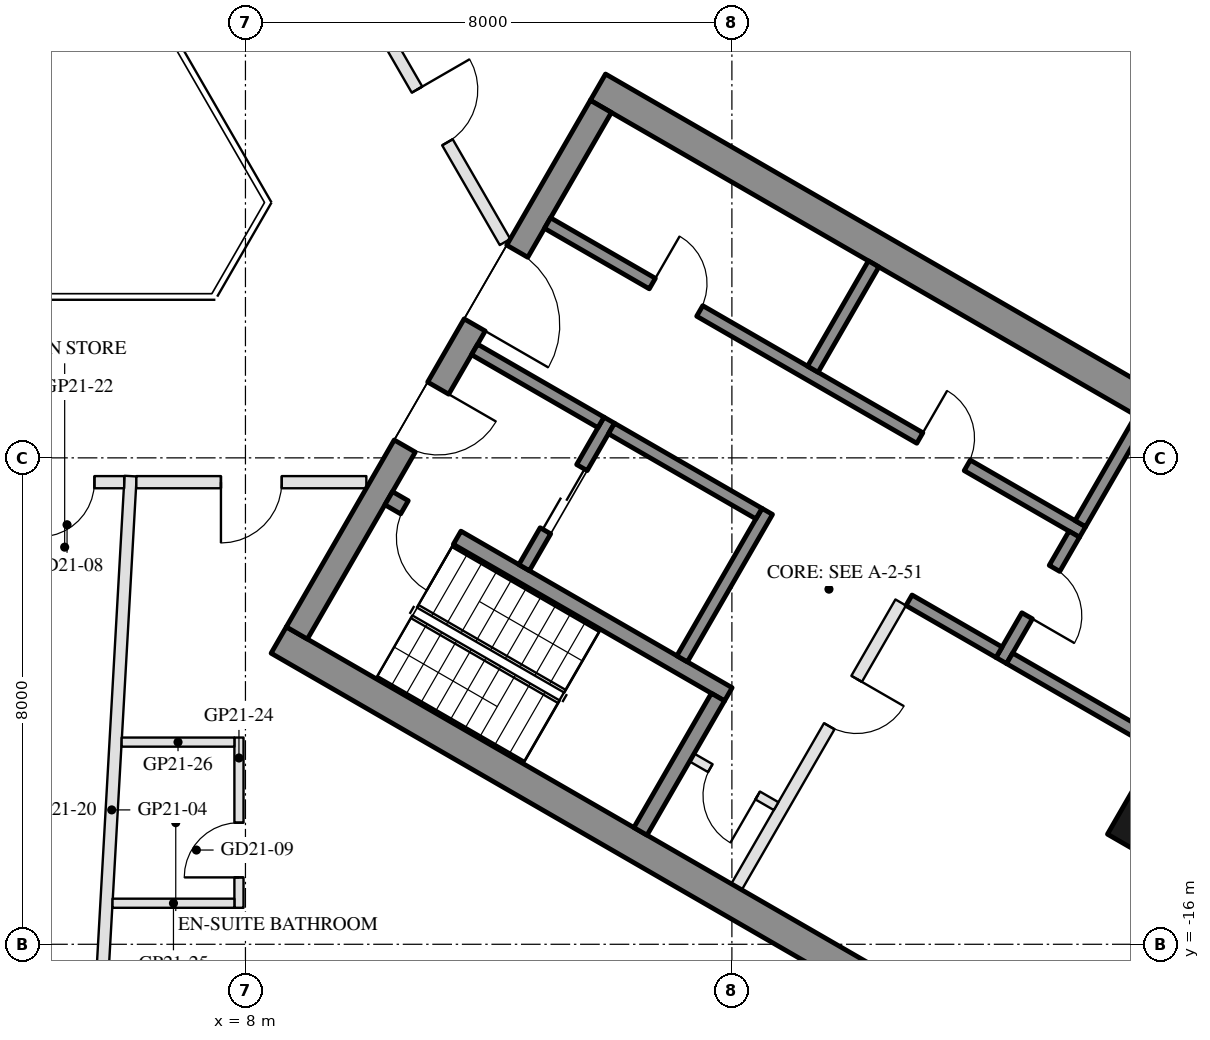
"""IFC4 building model, lengths in metres.
Left out: names, types, materials, properties, quantities, classifications, styles, units other than length and angle.
Written with IfcOpenShell. Run it as: python <this file> out.ifc"""

import sys

from ifc_helpers import new_model, si_unit, direction, frame, frame_2d, origin, origin_2d, place, context, subcontext, project, spatial, rectangle, hollow_rectangle, extrude, element, fill, save


model = new_model("IFC4")
c1 = context("Model", 3, precision=1e-05, world=origin(), true_north=direction((0.0, 1.0)))
c2 = subcontext(c1, "Body", "Model", "MODEL_VIEW")
j1 = project(units=[si_unit("LENGTHUNIT", "METRE"), si_unit("PLANEANGLEUNIT", "RADIAN")], contexts=[c1])
p1 = place(None, origin())
s1 = spatial("IfcSite", under=j1, at=p1, CompositionType="ELEMENT")
p2 = place(p1, origin())
s2 = spatial("IfcBuilding", under=s1, at=p2, CompositionType="ELEMENT")
p3 = place(p2, frame((0.0, 0.0, 220.6)))
s3 = spatial("IfcBuildingStorey", under=s2, at=p3, CompositionType="ELEMENT", Elevation=220.6)
p4 = place(p3, frame((23.729, -13.7, 0.0), z_axis=(0.0, 0.0, 1.0), x_axis=(0.5, 0.866025403784, 0.0)))
e1 = element("IfcColumn", 1, at=p4, inside=s3, PredefinedType="COLUMN", context=c2, shape_type="SweptSolid", body=[
    extrude(hollow_rectangle(XDim=2.4, YDim=2.2, WallThickness=0.06, at=origin_2d()), origin(), (0.0, 0.0, 1.0), 3.7),
])
p5 = place(p3, frame((26.257, -6.567, 0.0), z_axis=(0.0, 0.0, 1.0), x_axis=(-0.500023526245, 0.866011820475, 0.0)))
e2 = element("IfcWall", 2, at=p5, inside=s3, PredefinedType="SOLIDWALL", context=c2, shape_type="SweptSolid", body=[
    extrude(rectangle(XDim=11.816, YDim=0.35, at=frame_2d((5.908, 0.0))), origin(), (0.0, 0.0, 1.0), 3.55),
])
p6 = place(p5, frame((0.38, 0.0, 0.3)))
e3 = element("IfcOpeningElement", 3, at=p6, cuts=e2, PredefinedType="OPENING", context=c2, shape_type="SweptSolid", body=[
    extrude(rectangle(XDim=1.9, YDim=2.65, at=frame_2d((0.95, 1.325))), frame((0.0, 0.185, 0.0), z_axis=(0.0, -1.0, 0.0), x_axis=(1.0, 0.0, 0.0)), (0.0, 0.0, 1.0), 0.37),
])
p7 = place(p5, frame((7.791, 0.0, 0.0)))
e4 = element("IfcOpeningElement", 4, at=p7, cuts=e2, PredefinedType="OPENING", context=c2, shape_type="SweptSolid", body=[
    extrude(rectangle(XDim=2.4, YDim=2.4, at=frame_2d((1.2, 1.2))), frame((0.0, 0.185, 0.0), z_axis=(0.0, -1.0, 0.0), x_axis=(1.0, 0.0, 0.0)), (0.0, 0.0, 1.0), 0.37),
])
p8 = place(p5, frame((3.741, 0.0, 0.3)))
e5 = element("IfcOpeningElement", 5, at=p8, cuts=e2, PredefinedType="OPENING", context=c2, shape_type="SweptSolid", body=[
    extrude(rectangle(XDim=1.7, YDim=2.65, at=frame_2d((0.85, 1.325))), frame((0.0, 0.185, 0.0), z_axis=(0.0, -1.0, 0.0), x_axis=(1.0, 0.0, 0.0)), (0.0, 0.0, 1.0), 0.37),
])
p9 = place(p5, frame((5.741, 0.0, 0.3)))
e6 = element("IfcOpeningElement", 6, at=p9, cuts=e2, PredefinedType="OPENING", context=c2, shape_type="SweptSolid", body=[
    extrude(rectangle(XDim=1.7, YDim=2.65, at=frame_2d((0.85, 1.325))), frame((0.0, 0.185, 0.0), z_axis=(0.0, -1.0, 0.0), x_axis=(1.0, 0.0, 0.0)), (0.0, 0.0, 1.0), 0.37),
])
for number, where, z_axis, x_axis in (
    (7, (8.547, -10.997, 0.0), (0.0, 0.0, 1.0), (0.866, -0.5, 0.0)),
    (8, (13.797, -1.903, 0.0), (0.0, 0.0, 1.0), (0.866, -0.5, 0.0)),
):
    element("IfcWall", number, at=place(p3, frame(where, z_axis=z_axis, x_axis=x_axis)), inside=s3, PredefinedType="SHEAR", context=c2, shape_type="SweptSolid", body=[
        extrude(rectangle(XDim=14.837, YDim=0.5, at=frame_2d((7.418, 0.0))), origin(), (0.0, 0.0, 1.0), 3.5),
    ])
p10 = place(p3, frame((8.845, -10.88, 0.0), z_axis=(0.0, 0.0, 1.0), x_axis=(0.500004234368, 0.866022959057, 0.0)))
e9 = element("IfcWall", 9, at=p10, inside=s3, PredefinedType="SHEAR", context=c2, shape_type="SweptSolid", body=[
    extrude(rectangle(XDim=10.0, YDim=0.4, at=frame_2d((5.0, 0.0))), origin(), (0.0, 0.0, 1.0), 3.5),
])
p11 = place(p10, frame((3.55, 0.0, 0.0)))
e10 = element("IfcOpeningElement", 10, at=p11, cuts=e9, PredefinedType="OPENING", context=c2, shape_type="SweptSolid", body=[
    extrude(rectangle(XDim=1.1, YDim=2.1, at=frame_2d((0.55, 1.05))), frame((0.0, 0.21, 0.0), z_axis=(0.0, -1.0, 0.0), x_axis=(1.0, 0.0, 0.0)), (0.0, 0.0, 1.0), 0.42),
])
p12 = place(p10, frame((5.85, 0.0, 0.0)))
e11 = element("IfcOpeningElement", 11, at=p12, cuts=e9, PredefinedType="OPENING", context=c2, shape_type="SweptSolid", body=[
    extrude(rectangle(XDim=1.4, YDim=2.1, at=frame_2d((0.7, 1.05))), frame((0.0, 0.21, 0.0), z_axis=(0.0, -1.0, 0.0), x_axis=(1.0, 0.0, 0.0)), (0.0, 0.0, 1.0), 0.42),
])
p13 = place(p3, frame((10.356, -8.664, 0.0), z_axis=(0.0, 0.0, 1.0), x_axis=(0.866028629588, -0.499994412703, 0.0)))
e12 = element("IfcWall", 12, at=p13, inside=s3, PredefinedType="SHEAR", context=c2, shape_type="SweptSolid", body=[
    extrude(rectangle(XDim=6.45, YDim=0.25, at=frame_2d((3.225, 0.0))), origin(), (0.0, 0.0, 1.0), 3.5),
])
p14 = place(p13, frame((0.3, 0.0, 0.0)))
e13 = element("IfcOpeningElement", 13, at=p14, cuts=e12, PredefinedType="OPENING", context=c2, shape_type="SweptSolid", body=[
    extrude(rectangle(XDim=1.0, YDim=2.1, at=frame_2d((0.5, 1.05))), frame((0.0, 0.135, 0.0), z_axis=(0.0, -1.0, 0.0), x_axis=(1.0, 0.0, 0.0)), (0.0, 0.0, 1.0), 0.27),
])
p15 = place(p3, frame((14.496, -14.143, 0.0), z_axis=(0.0, 0.0, 1.0), x_axis=(0.500062241894, 0.865989465428, 0.0)))
e14 = element("IfcWall", 14, at=p15, inside=s3, PredefinedType="SHEAR", context=c2, shape_type="SweptSolid", body=[
    extrude(rectangle(XDim=2.55, YDim=0.25, at=frame_2d((1.275, 0.0))), origin(), (0.0, 0.0, 1.0), 3.5),
])
p16 = place(p3, frame((15.181, -11.305, 0.0), z_axis=(0.0, 0.0, 1.0), x_axis=(0.49994636267, 0.866056369097, 0.0)))
e15 = element("IfcWall", 15, at=p16, inside=s3, PredefinedType="SHEAR", context=c2, shape_type="SweptSolid", body=[
    extrude(rectangle(XDim=2.8, YDim=0.2, at=frame_2d((1.4, 0.0))), origin(), (0.0, 0.0, 1.0), 3.5),
])
p17 = place(p3, frame((12.583, -9.805, 0.0), z_axis=(0.0, 0.0, 1.0), x_axis=(0.49994636267, 0.866056369097, 0.0)))
e16 = element("IfcWall", 16, at=p17, inside=s3, PredefinedType="SHEAR", context=c2, shape_type="SweptSolid", body=[
    extrude(rectangle(XDim=2.8, YDim=0.2, at=frame_2d((1.4, 0.0))), origin(), (0.0, 0.0, 1.0), 3.5),
])
p18 = place(p17, frame((0.7, 0.0, 0.0)))
e17 = element("IfcOpeningElement", 17, at=p18, cuts=e16, PredefinedType="OPENING", context=c2, shape_type="SweptSolid", body=[
    extrude(rectangle(XDim=1.2, YDim=2.1, at=frame_2d((0.6, 1.05))), frame((0.0, 0.11, 0.0), z_axis=(0.0, -1.0, 0.0), x_axis=(1.0, 0.0, 0.0)), (0.0, 0.0, 1.0), 0.22),
])
p19 = place(p3, frame((11.768, -6.217, 0.0), z_axis=(0.0, 0.0, 1.0), x_axis=(0.866050077142, -0.499957262057, 0.0)))
e18 = element("IfcWall", 18, at=p19, inside=s3, PredefinedType="SHEAR", context=c2, shape_type="SweptSolid", body=[
    extrude(rectangle(XDim=2.4, YDim=0.2, at=frame_2d((1.2, 0.0))), origin(), (0.0, 0.0, 1.0), 3.5),
])
p20 = place(p3, frame((14.02, -7.517, 0.0), z_axis=(0.0, 0.0, 1.0), x_axis=(0.866034573852, -0.49998411664, 0.0)))
e19 = element("IfcWall", 19, at=p20, inside=s3, PredefinedType="SHEAR", context=c2, shape_type="SweptSolid", body=[
    extrude(rectangle(XDim=2.8, YDim=0.2, at=frame_2d((1.4, 0.0))), origin(), (0.0, 0.0, 1.0), 3.5),
])
p21 = place(p3, frame((12.968, -4.138, 0.0), z_axis=(0.0, 0.0, 1.0), x_axis=(0.866028328073, -0.49999493495, 0.0)))
e20 = element("IfcWall", 20, at=p21, inside=s3, PredefinedType="SHEAR", context=c2, shape_type="SweptSolid", body=[
    extrude(rectangle(XDim=10.16, YDim=0.2, at=frame_2d((5.08, 0.0))), origin(), (0.0, 0.0, 1.0), 3.5),
])
p22 = place(p21, frame((1.99, 0.0, 0.0)))
e21 = element("IfcOpeningElement", 21, at=p22, cuts=e20, PredefinedType="OPENING", context=c2, shape_type="SweptSolid", body=[
    extrude(rectangle(XDim=0.9, YDim=2.1, at=frame_2d((0.45, 1.05))), frame((0.0, 0.11, 0.0), z_axis=(0.0, -1.0, 0.0), x_axis=(1.0, 0.0, 0.0)), (0.0, 0.0, 1.0), 0.22),
])
p23 = place(p21, frame((7.07, 0.0, 0.0)))
e22 = element("IfcOpeningElement", 22, at=p23, cuts=e20, PredefinedType="OPENING", context=c2, shape_type="SweptSolid", body=[
    extrude(rectangle(XDim=0.9, YDim=2.1, at=frame_2d((0.45, 1.05))), frame((0.0, 0.11, 0.0), z_axis=(0.0, -1.0, 0.0), x_axis=(1.0, 0.0, 0.0)), (0.0, 0.0, 1.0), 0.22),
])
p24 = place(p3, frame((20.43, -11.333, 0.0), z_axis=(0.0, 0.0, 1.0), x_axis=(0.500001309137, 0.866024647952, 0.0)))
e23 = element("IfcWall", 23, at=p24, inside=s3, PredefinedType="SHEAR", context=c2, shape_type="SweptSolid", body=[
    extrude(rectangle(XDim=2.4, YDim=0.2, at=frame_2d((1.2, 0.0))), origin(), (0.0, 0.0, 1.0), 3.5),
])
p25 = place(p24, frame((0.85, 0.0, 0.0)))
e24 = element("IfcOpeningElement", 24, at=p25, cuts=e23, PredefinedType="OPENING", context=c2, shape_type="SweptSolid", body=[
    extrude(rectangle(XDim=0.9, YDim=2.1, at=frame_2d((0.45, 1.05))), frame((0.0, 0.11, 0.0), z_axis=(0.0, -1.0, 0.0), x_axis=(1.0, 0.0, 0.0)), (0.0, 0.0, 1.0), 0.22),
])
p26 = place(p3, frame((18.913, -10.342, 0.0), z_axis=(0.0, 0.0, 1.0), x_axis=(0.866038183914, -0.499977863513, 0.0)))
e25 = element("IfcWall", 25, at=p26, inside=s3, PredefinedType="SHEAR", context=c2, shape_type="SweptSolid", body=[
    extrude(rectangle(XDim=1.71, YDim=0.2, at=frame_2d((0.855, 0.0))), origin(), (0.0, 0.0, 1.0), 3.5),
])
for number, where, z_axis, x_axis in (
    (26, (17.331, -6.542, 0.0), (0.0, 0.0, 1.0), (0.5, 0.866, 0.0)),
    (27, (21.73, -9.082, 0.0), (0.0, 0.0, 1.0), (0.5, 0.866, 0.0)),
):
    element("IfcWall", number, at=place(p3, frame(where, z_axis=z_axis, x_axis=x_axis)), inside=s3, PredefinedType="SHEAR", context=c2, shape_type="SweptSolid", body=[
        extrude(rectangle(XDim=2.0, YDim=0.2, at=frame_2d((1.0, 0.0))), origin(), (0.0, 0.0, 1.0), 3.5),
    ])
p27 = place(p3, frame((20.567, -11.297, 0.0), z_axis=(0.0, 0.0, 1.0), x_axis=(0.866055327414, -0.49994816717, 0.0)))
e28 = element("IfcWall", 28, at=p27, inside=s3, PredefinedType="SHEAR", context=c2, shape_type="SweptSolid", body=[
    extrude(rectangle(XDim=2.84, YDim=0.2, at=frame_2d((1.42, 0.0))), origin(), (0.0, 0.0, 1.0), 3.5),
])
p28 = place(p3, frame((16.076, -15.055, 0.0), z_axis=(0.0, 0.0, 1.0), x_axis=(0.499995103361, 0.866028230842, 0.0)))
e29 = element("IfcWall", 29, at=p28, inside=s3, PredefinedType="PARTITIONING", context=c2, shape_type="SweptSolid", body=[
    extrude(rectangle(XDim=5.4, YDim=0.2, at=frame_2d((2.7, 0.0))), origin(), (0.0, 0.0, 1.0), 3.5),
])
p29 = place(p28, frame((3.05, 0.0, 0.0)))
e30 = element("IfcOpeningElement", 30, at=p29, cuts=e29, PredefinedType="OPENING", context=c2, shape_type="SweptSolid", body=[
    extrude(rectangle(XDim=0.9, YDim=2.1, at=frame_2d((0.45, 1.05))), frame((0.0, 0.11, 0.0), z_axis=(0.0, -1.0, 0.0), x_axis=(1.0, 0.0, 0.0)), (0.0, 0.0, 1.0), 0.22),
])
p30 = place(p3, frame((15.342, -12.928, 0.0), z_axis=(0.0, 0.0, 1.0), x_axis=(0.865989903783, -0.500061482766, 0.0)))
e31 = element("IfcWall", 31, at=p30, inside=s3, PredefinedType="PARTITIONING", context=c2, shape_type="SweptSolid", body=[
    extrude(rectangle(XDim=1.6, YDim=0.15, at=frame_2d((0.8, 0.0))), origin(), (0.0, 0.0, 1.0), 3.5),
])
p31 = place(p30, frame((0.35, 0.0, 0.0)))
e32 = element("IfcOpeningElement", 32, at=p31, cuts=e31, PredefinedType="OPENING", context=c2, shape_type="SweptSolid", body=[
    extrude(rectangle(XDim=0.9, YDim=2.1, at=frame_2d((0.45, 1.05))), frame((0.0, 0.085, 0.0), z_axis=(0.0, -1.0, 0.0), x_axis=(1.0, 0.0, 0.0)), (0.0, 0.0, 1.0), 0.17),
])
p32 = place(p3, frame((5.49, -19.28, 0.0), z_axis=(0.0, 0.0, 1.0), x_axis=(0.056497863711, 0.998402720046, 0.0)))
e33 = element("IfcWall", 33, at=p32, inside=s3, PredefinedType="PARTITIONING", context=c2, shape_type="SweptSolid", body=[
    extrude(rectangle(XDim=10.998, YDim=0.2, at=frame_2d((5.499, 0.0))), origin(), (0.0, 0.0, 1.0), 3.06),
])
p33 = place(p3, frame((6.006, -8.4, 0.0), z_axis=(0.0, 0.0, 1.0), x_axis=(-1.0, 0.0, 0.0)))
e34 = element("IfcWall", 34, at=p33, inside=s3, PredefinedType="PARTITIONING", context=c2, shape_type="SweptSolid", body=[
    extrude(rectangle(XDim=1.879, YDim=0.2, at=frame_2d((0.939, 0.0))), origin(), (0.0, 0.0, 1.0), 3.55),
])
p34 = place(p33, frame((0.49, 0.0, 0.0)))
e35 = element("IfcOpeningElement", 35, at=p34, cuts=e34, PredefinedType="OPENING", context=c2, shape_type="SweptSolid", body=[
    extrude(rectangle(XDim=0.9, YDim=2.1, at=frame_2d((0.45, 1.05))), frame((0.0, 0.11, 0.0), z_axis=(0.0, -1.0, 0.0), x_axis=(1.0, 0.0, 0.0)), (0.0, 0.0, 1.0), 0.22),
])
p35 = place(p3, frame((9.988, -8.4, 0.0), z_axis=(0.0, 0.0, 1.0), x_axis=(-1.0, 0.0, 0.0)))
e36 = element("IfcWall", 36, at=p35, inside=s3, PredefinedType="PARTITIONING", context=c2, shape_type="SweptSolid", body=[
    extrude(rectangle(XDim=3.782, YDim=0.2, at=frame_2d((1.891, 0.0))), origin(), (0.0, 0.0, 1.0), 2.95),
])
p36 = place(p35, frame((1.391, 0.0, 0.0)))
e37 = element("IfcOpeningElement", 37, at=p36, cuts=e36, PredefinedType="OPENING", context=c2, shape_type="SweptSolid", body=[
    extrude(rectangle(XDim=1.0, YDim=2.1, at=frame_2d((0.5, 1.05))), frame((0.0, 0.11, 0.0), z_axis=(0.0, -1.0, 0.0), x_axis=(1.0, 0.0, 0.0)), (0.0, 0.0, 1.0), 0.22),
])
p37 = place(p3, frame((7.893, -15.4, 0.0), z_axis=(0.0, 0.0, 1.0), x_axis=(0.0, 1.0, 0.0)))
e38 = element("IfcWall", 38, at=p37, inside=s3, PredefinedType="PARTITIONING", context=c2, shape_type="SweptSolid", body=[
    extrude(rectangle(XDim=2.8, YDim=0.15, at=frame_2d((1.4, 0.0))), origin(), (0.0, 0.0, 1.0), 2.95),
])
p38 = place(p37, frame((0.5, 0.0, 0.0)))
e39 = element("IfcOpeningElement", 39, at=p38, cuts=e38, PredefinedType="OPENING", context=c2, shape_type="SweptSolid", body=[
    extrude(rectangle(XDim=0.9, YDim=2.1, at=frame_2d((0.45, 1.05))), frame((0.0, 0.085, 0.0), z_axis=(0.0, -1.0, 0.0), x_axis=(1.0, 0.0, 0.0)), (0.0, 0.0, 1.0), 0.17),
])
p39 = place(p3, frame((5.814, -15.325, 0.0), z_axis=(0.0, 0.0, 1.0), x_axis=(1.0, 0.0, 0.0)))
e40 = element("IfcWall", 40, at=p39, inside=s3, PredefinedType="PARTITIONING", context=c2, shape_type="SweptSolid", body=[
    extrude(rectangle(XDim=2.004, YDim=0.15, at=frame_2d((1.002, 0.0))), origin(), (0.0, 0.0, 1.0), 2.95),
])
p40 = place(p3, frame((5.964, -12.675, 0.0), z_axis=(0.0, 0.0, 1.0), x_axis=(1.0, 0.0, 0.0)))
e41 = element("IfcWall", 41, at=p40, inside=s3, PredefinedType="PARTITIONING", context=c2, shape_type="SweptSolid", body=[
    extrude(rectangle(XDim=1.854, YDim=0.15, at=frame_2d((0.927, 0.0))), origin(), (0.0, 0.0, 1.0), 2.95),
])
p41 = place(p3, frame((9.875, -0.303, 0.0), z_axis=(0.0, 0.0, 1.0), x_axis=(0.500026984917, -0.866009823475, 0.0)))
e42 = element("IfcWall", 42, at=p41, inside=s3, PredefinedType="PARTITIONING", context=c2, shape_type="SweptSolid", body=[
    extrude(rectangle(XDim=4.788, YDim=0.2, at=frame_2d((2.394, 0.0))), origin(), (0.0, 0.0, 1.0), 2.95),
])
p42 = place(p41, frame((1.894, 0.0, 0.0)))
e43 = element("IfcOpeningElement", 43, at=p42, cuts=e42, PredefinedType="OPENING", context=c2, shape_type="SweptSolid", body=[
    extrude(rectangle(XDim=1.0, YDim=2.1, at=frame_2d((0.5, 1.05))), frame((0.0, 0.11, 0.0), z_axis=(0.0, -1.0, 0.0), x_axis=(1.0, 0.0, 0.0)), (0.0, 0.0, 1.0), 0.22),
])
p43 = place(p9, origin())
e44 = element("IfcWindow", 44, at=p43, inside=s3, PartitioningType="SINGLE_PANEL", PredefinedType="WINDOW", context=c2, shape_type="SweptSolid", body=[
    extrude(rectangle(XDim=1.7, YDim=2.65, at=frame_2d((0.85, 1.325))), frame((0.0, 0.03, 0.0), z_axis=(0.0, -1.0, 0.0), x_axis=(1.0, 0.0, 0.0)), (0.0, 0.0, 1.0), 0.06),
])
fill(e6, e44)
p44 = place(p18, origin())
e45 = element("IfcDoor", 45, at=p44, inside=s3, OperationType="DOUBLE_DOOR_SLIDING", PredefinedType="DOOR", context=c2, shape_type="SweptSolid", body=[
    extrude(rectangle(XDim=1.2, YDim=2.1, at=frame_2d((0.6, 1.05))), frame((0.0, 0.025, 0.0), z_axis=(0.0, -1.0, 0.0), x_axis=(1.0, 0.0, 0.0)), (0.0, 0.0, 1.0), 0.05),
])
fill(e17, e45)
p45 = place(p31, frame((0.9, 0.0, 0.0), z_axis=(0.0, 0.0, 1.0), x_axis=(-1.0, 0.0, 0.0)))
e46 = element("IfcDoor", 46, at=p45, inside=s3, OperationType="SINGLE_SWING_LEFT", PredefinedType="DOOR", context=c2, shape_type="SweptSolid", body=[
    extrude(rectangle(XDim=0.9, YDim=2.1, at=frame_2d((0.45, 1.05))), frame((0.0, 0.025, 0.0), z_axis=(0.0, -1.0, 0.0), x_axis=(1.0, 0.0, 0.0)), (0.0, 0.0, 1.0), 0.05),
])
fill(e32, e46)
p46 = place(p22, origin())
e47 = element("IfcDoor", 47, at=p46, inside=s3, OperationType="SINGLE_SWING_LEFT", PredefinedType="DOOR", context=c2, shape_type="SweptSolid", body=[
    extrude(rectangle(XDim=0.9, YDim=2.1, at=frame_2d((0.45, 1.05))), frame((0.0, 0.025, 0.0), z_axis=(0.0, -1.0, 0.0), x_axis=(1.0, 0.0, 0.0)), (0.0, 0.0, 1.0), 0.05),
])
fill(e21, e47)
p47 = place(p23, origin())
e48 = element("IfcDoor", 48, at=p47, inside=s3, OperationType="SINGLE_SWING_LEFT", PredefinedType="DOOR", context=c2, shape_type="SweptSolid", body=[
    extrude(rectangle(XDim=0.9, YDim=2.1, at=frame_2d((0.45, 1.05))), frame((0.0, 0.025, 0.0), z_axis=(0.0, -1.0, 0.0), x_axis=(1.0, 0.0, 0.0)), (0.0, 0.0, 1.0), 0.05),
])
fill(e22, e48)
p48 = place(p25, frame((0.9, 0.0, 0.0), z_axis=(0.0, 0.0, 1.0), x_axis=(-1.0, 0.0, 0.0)))
e49 = element("IfcDoor", 49, at=p48, inside=s3, OperationType="SINGLE_SWING_RIGHT", PredefinedType="DOOR", context=c2, shape_type="SweptSolid", body=[
    extrude(rectangle(XDim=0.9, YDim=2.1, at=frame_2d((0.45, 1.05))), frame((0.0, 0.025, 0.0), z_axis=(0.0, -1.0, 0.0), x_axis=(1.0, 0.0, 0.0)), (0.0, 0.0, 1.0), 0.05),
])
fill(e24, e49)
p49 = place(p29, frame((0.9, 0.0, 0.0), z_axis=(0.0, 0.0, 1.0), x_axis=(-1.0, 0.0, 0.0)))
e50 = element("IfcDoor", 50, at=p49, inside=s3, OperationType="SINGLE_SWING_LEFT", PredefinedType="DOOR", context=c2, shape_type="SweptSolid", body=[
    extrude(rectangle(XDim=0.9, YDim=2.1, at=frame_2d((0.45, 1.05))), frame((0.0, 0.025, 0.0), z_axis=(0.0, -1.0, 0.0), x_axis=(1.0, 0.0, 0.0)), (0.0, 0.0, 1.0), 0.05),
])
fill(e30, e50)
p50 = place(p11, frame((1.1, 0.0, 0.0), z_axis=(0.0, 0.0, 1.0), x_axis=(-1.0, 0.0, 0.0)))
e51 = element("IfcDoor", 51, at=p50, inside=s3, OperationType="SINGLE_SWING_LEFT", PredefinedType="DOOR", context=c2, shape_type="SweptSolid", body=[
    extrude(rectangle(XDim=1.1, YDim=2.1, at=frame_2d((0.55, 1.05))), frame((0.0, 0.025, 0.0), z_axis=(0.0, -1.0, 0.0), x_axis=(1.0, 0.0, 0.0)), (0.0, 0.0, 1.0), 0.05),
])
fill(e10, e51)
p51 = place(p12, frame((1.4, 0.0, 0.0), z_axis=(0.0, 0.0, 1.0), x_axis=(-1.0, 0.0, 0.0)))
e52 = element("IfcDoor", 52, at=p51, inside=s3, OperationType="DOUBLE_DOOR_SINGLE_SWING", PredefinedType="DOOR", context=c2, shape_type="SweptSolid", body=[
    extrude(rectangle(XDim=1.4, YDim=2.1, at=frame_2d((0.7, 1.05))), frame((0.0, 0.025, 0.0), z_axis=(0.0, -1.0, 0.0), x_axis=(1.0, 0.0, 0.0)), (0.0, 0.0, 1.0), 0.05),
])
fill(e11, e52)
p52 = place(p14, frame((1.0, 0.0, 0.0), z_axis=(0.0, 0.0, 1.0), x_axis=(-1.0, 0.0, 0.0)))
e53 = element("IfcDoor", 53, at=p52, inside=s3, OperationType="SINGLE_SWING_LEFT", PredefinedType="DOOR", context=c2, shape_type="SweptSolid", body=[
    extrude(rectangle(XDim=1.0, YDim=2.1, at=frame_2d((0.5, 1.05))), frame((0.0, 0.025, 0.0), z_axis=(0.0, -1.0, 0.0), x_axis=(1.0, 0.0, 0.0)), (0.0, 0.0, 1.0), 0.05),
])
fill(e13, e53)
p53 = place(p34, origin())
e54 = element("IfcDoor", 54, at=p53, inside=s3, OperationType="SINGLE_SWING_RIGHT", PredefinedType="DOOR", context=c2, shape_type="SweptSolid", body=[
    extrude(rectangle(XDim=0.9, YDim=2.1, at=frame_2d((0.45, 1.05))), frame((0.0, 0.025, 0.0), z_axis=(0.0, -1.0, 0.0), x_axis=(1.0, 0.0, 0.0)), (0.0, 0.0, 1.0), 0.05),
])
fill(e35, e54)
p54 = place(p38, origin())
e55 = element("IfcDoor", 55, at=p54, inside=s3, OperationType="SINGLE_SWING_LEFT", PredefinedType="DOOR", context=c2, shape_type="SweptSolid", body=[
    extrude(rectangle(XDim=0.9, YDim=2.1, at=frame_2d((0.45, 1.05))), frame((0.0, 0.025, 0.0), z_axis=(0.0, -1.0, 0.0), x_axis=(1.0, 0.0, 0.0)), (0.0, 0.0, 1.0), 0.05),
])
fill(e39, e55)
p55 = place(p36, origin())
e56 = element("IfcDoor", 56, at=p55, inside=s3, OperationType="SINGLE_SWING_RIGHT", PredefinedType="DOOR", context=c2, shape_type="SweptSolid", body=[
    extrude(rectangle(XDim=1.0, YDim=2.1, at=frame_2d((0.5, 1.05))), frame((0.0, 0.025, 0.0), z_axis=(0.0, -1.0, 0.0), x_axis=(1.0, 0.0, 0.0)), (0.0, 0.0, 1.0), 0.05),
])
fill(e37, e56)
p56 = place(p42, origin())
e57 = element("IfcDoor", 57, at=p56, inside=s3, OperationType="SINGLE_SWING_LEFT", PredefinedType="DOOR", context=c2, shape_type="SweptSolid", body=[
    extrude(rectangle(XDim=1.0, YDim=2.1, at=frame_2d((0.5, 1.05))), frame((0.0, 0.025, 0.0), z_axis=(0.0, -1.0, 0.0), x_axis=(1.0, 0.0, 0.0)), (0.0, 0.0, 1.0), 0.05),
])
fill(e43, e57)
save(model, sys.argv[1])
